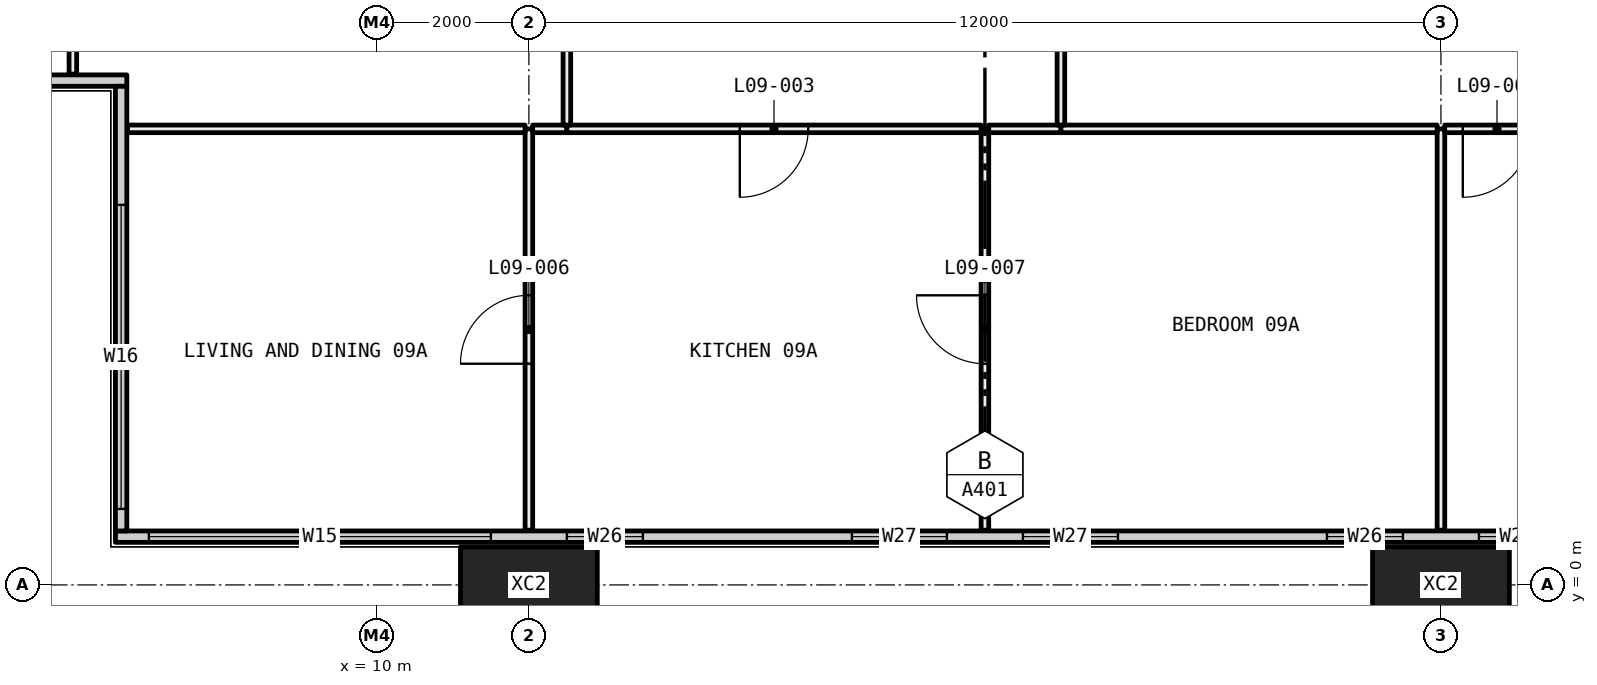
"""IFC4 building model, lengths in metres.
Left out: names, types, materials, properties, quantities, classifications, styles, units other than length and angle.
Written with IfcOpenShell. Run it as: python <this file> out.ifc"""

import sys

from ifc_helpers import new_model, si_unit, direction, frame, frame_2d, origin, origin_2d, place, context, subcontext, project, spatial, rectangle, hollow_rectangle, extrude, element, fill, save


model = new_model("IFC4")
c1 = context("Model", 3, precision=1e-05, world=origin(), true_north=direction((0.0, 1.0)))
c2 = subcontext(c1, "Body", "Model", "MODEL_VIEW")
j1 = project(units=[si_unit("LENGTHUNIT", "METRE"), si_unit("PLANEANGLEUNIT", "RADIAN")], contexts=[c1])
p1 = place(None, origin())
s1 = spatial("IfcSite", under=j1, at=p1, CompositionType="ELEMENT")
p2 = place(p1, origin())
s2 = spatial("IfcBuilding", under=s1, at=p2, CompositionType="ELEMENT")
p3 = place(p2, frame((0.0, 0.0, 43.8)))
s3 = spatial("IfcBuildingStorey", under=s2, at=p3, CompositionType="ELEMENT", Elevation=43.8)
for number, where, z_axis, x_axis in (
    (1, (12.0, 0.0, -0.4), (0.0, 0.0, 1.0), (1.0, 0.0, 0.0)),
    (2, (24.0, 0.0, -0.4), (0.0, 0.0, 1.0), (1.0, 0.0, 0.0)),
):
    element("IfcColumn", number, at=place(p3, frame(where, z_axis=z_axis, x_axis=x_axis)), inside=s3, PredefinedType="COLUMN", context=c2, shape_type="SweptSolid", body=[
        extrude(hollow_rectangle(XDim=1.8, YDim=1.0, WallThickness=0.07, at=origin_2d()), origin(), (0.0, 0.0, 1.0), 3.45),
    ])
p4 = place(p3, frame((6.56, 0.635, 0.0), z_axis=(0.0, 0.0, 1.0), x_axis=(1.0, 0.0, 0.0)))
e3 = element("IfcWall", 3, at=p4, inside=s3, PredefinedType="ELEMENTEDWALL", context=c2, shape_type="SweptSolid", body=[
    extrude(rectangle(XDim=58.88, YDim=0.15, at=frame_2d((29.44, 0.0))), origin(), (0.0, 0.0, 1.0), 3.05),
])
p5 = place(p4, frame((0.44, 0.0, 0.45)))
e4 = element("IfcOpeningElement", 4, at=p5, cuts=e3, PredefinedType="OPENING", context=c2, shape_type="SweptSolid", body=[
    extrude(rectangle(XDim=4.5, YDim=2.55, at=frame_2d((2.25, 1.275))), frame((0.0, 0.085, 0.0), z_axis=(0.0, -1.0, 0.0), x_axis=(1.0, 0.0, 0.0)), (0.0, 0.0, 1.0), 0.17),
])
p6 = place(p4, frame((5.94, 0.0, 0.45)))
e5 = element("IfcOpeningElement", 5, at=p6, cuts=e3, PredefinedType="OPENING", context=c2, shape_type="SweptSolid", body=[
    extrude(rectangle(XDim=1.0, YDim=2.55, at=frame_2d((0.5, 1.275))), frame((0.0, 0.085, 0.0), z_axis=(0.0, -1.0, 0.0), x_axis=(1.0, 0.0, 0.0)), (0.0, 0.0, 1.0), 0.17),
])
p7 = place(p4, frame((9.69, 0.0, 0.45)))
e6 = element("IfcOpeningElement", 6, at=p7, cuts=e3, PredefinedType="OPENING", context=c2, shape_type="SweptSolid", body=[
    extrude(rectangle(XDim=1.25, YDim=2.55, at=frame_2d((0.625, 1.275))), frame((0.0, 0.085, 0.0), z_axis=(0.0, -1.0, 0.0), x_axis=(1.0, 0.0, 0.0)), (0.0, 0.0, 1.0), 0.17),
])
p8 = place(p4, frame((11.94, 0.0, 0.45)))
e7 = element("IfcOpeningElement", 7, at=p8, cuts=e3, PredefinedType="OPENING", context=c2, shape_type="SweptSolid", body=[
    extrude(rectangle(XDim=1.25, YDim=2.55, at=frame_2d((0.625, 1.275))), frame((0.0, 0.085, 0.0), z_axis=(0.0, -1.0, 0.0), x_axis=(1.0, 0.0, 0.0)), (0.0, 0.0, 1.0), 0.17),
])
p9 = place(p4, frame((15.94, 0.0, 0.45)))
e8 = element("IfcOpeningElement", 8, at=p9, cuts=e3, PredefinedType="OPENING", context=c2, shape_type="SweptSolid", body=[
    extrude(rectangle(XDim=1.0, YDim=2.55, at=frame_2d((0.5, 1.275))), frame((0.0, 0.085, 0.0), z_axis=(0.0, -1.0, 0.0), x_axis=(1.0, 0.0, 0.0)), (0.0, 0.0, 1.0), 0.17),
])
p10 = place(p4, frame((17.94, 0.0, 0.45)))
e9 = element("IfcOpeningElement", 9, at=p10, cuts=e3, PredefinedType="OPENING", context=c2, shape_type="SweptSolid", body=[
    extrude(rectangle(XDim=1.0, YDim=2.55, at=frame_2d((0.5, 1.275))), frame((0.0, 0.085, 0.0), z_axis=(0.0, -1.0, 0.0), x_axis=(1.0, 0.0, 0.0)), (0.0, 0.0, 1.0), 0.17),
])
p11 = place(p4, frame((21.69, 0.0, 0.45)))
e10 = element("IfcOpeningElement", 10, at=p11, cuts=e3, PredefinedType="OPENING", context=c2, shape_type="SweptSolid", body=[
    extrude(rectangle(XDim=1.25, YDim=2.55, at=frame_2d((0.625, 1.275))), frame((0.0, 0.085, 0.0), z_axis=(0.0, -1.0, 0.0), x_axis=(1.0, 0.0, 0.0)), (0.0, 0.0, 1.0), 0.17),
])
p12 = place(p4, frame((23.94, 0.0, 0.45)))
e11 = element("IfcOpeningElement", 11, at=p12, cuts=e3, PredefinedType="OPENING", context=c2, shape_type="SweptSolid", body=[
    extrude(rectangle(XDim=1.25, YDim=2.55, at=frame_2d((0.625, 1.275))), frame((0.0, 0.085, 0.0), z_axis=(0.0, -1.0, 0.0), x_axis=(1.0, 0.0, 0.0)), (0.0, 0.0, 1.0), 0.17),
])
p13 = place(p4, frame((27.94, 0.0, 0.45)))
e12 = element("IfcOpeningElement", 12, at=p13, cuts=e3, PredefinedType="OPENING", context=c2, shape_type="SweptSolid", body=[
    extrude(rectangle(XDim=1.0, YDim=2.55, at=frame_2d((0.5, 1.275))), frame((0.0, 0.085, 0.0), z_axis=(0.0, -1.0, 0.0), x_axis=(1.0, 0.0, 0.0)), (0.0, 0.0, 1.0), 0.17),
])
p14 = place(p4, frame((29.94, 0.0, 0.45)))
e13 = element("IfcOpeningElement", 13, at=p14, cuts=e3, PredefinedType="OPENING", context=c2, shape_type="SweptSolid", body=[
    extrude(rectangle(XDim=1.0, YDim=2.55, at=frame_2d((0.5, 1.275))), frame((0.0, 0.085, 0.0), z_axis=(0.0, -1.0, 0.0), x_axis=(1.0, 0.0, 0.0)), (0.0, 0.0, 1.0), 0.17),
])
p15 = place(p4, frame((33.69, 0.0, 0.45)))
e14 = element("IfcOpeningElement", 14, at=p15, cuts=e3, PredefinedType="OPENING", context=c2, shape_type="SweptSolid", body=[
    extrude(rectangle(XDim=1.25, YDim=2.55, at=frame_2d((0.625, 1.275))), frame((0.0, 0.085, 0.0), z_axis=(0.0, -1.0, 0.0), x_axis=(1.0, 0.0, 0.0)), (0.0, 0.0, 1.0), 0.17),
])
p16 = place(p4, frame((35.94, 0.0, 0.45)))
e15 = element("IfcOpeningElement", 15, at=p16, cuts=e3, PredefinedType="OPENING", context=c2, shape_type="SweptSolid", body=[
    extrude(rectangle(XDim=1.25, YDim=2.55, at=frame_2d((0.625, 1.275))), frame((0.0, 0.085, 0.0), z_axis=(0.0, -1.0, 0.0), x_axis=(1.0, 0.0, 0.0)), (0.0, 0.0, 1.0), 0.17),
])
p17 = place(p4, frame((39.94, 0.0, 0.45)))
e16 = element("IfcOpeningElement", 16, at=p17, cuts=e3, PredefinedType="OPENING", context=c2, shape_type="SweptSolid", body=[
    extrude(rectangle(XDim=1.0, YDim=2.55, at=frame_2d((0.5, 1.275))), frame((0.0, 0.085, 0.0), z_axis=(0.0, -1.0, 0.0), x_axis=(1.0, 0.0, 0.0)), (0.0, 0.0, 1.0), 0.17),
])
p18 = place(p4, frame((41.94, 0.0, 0.45)))
e17 = element("IfcOpeningElement", 17, at=p18, cuts=e3, PredefinedType="OPENING", context=c2, shape_type="SweptSolid", body=[
    extrude(rectangle(XDim=1.0, YDim=2.55, at=frame_2d((0.5, 1.275))), frame((0.0, 0.085, 0.0), z_axis=(0.0, -1.0, 0.0), x_axis=(1.0, 0.0, 0.0)), (0.0, 0.0, 1.0), 0.17),
])
p19 = place(p4, frame((45.69, 0.0, 0.45)))
e18 = element("IfcOpeningElement", 18, at=p19, cuts=e3, PredefinedType="OPENING", context=c2, shape_type="SweptSolid", body=[
    extrude(rectangle(XDim=1.25, YDim=2.55, at=frame_2d((0.625, 1.275))), frame((0.0, 0.085, 0.0), z_axis=(0.0, -1.0, 0.0), x_axis=(1.0, 0.0, 0.0)), (0.0, 0.0, 1.0), 0.17),
])
p20 = place(p4, frame((47.94, 0.0, 0.45)))
e19 = element("IfcOpeningElement", 19, at=p20, cuts=e3, PredefinedType="OPENING", context=c2, shape_type="SweptSolid", body=[
    extrude(rectangle(XDim=1.25, YDim=2.55, at=frame_2d((0.625, 1.275))), frame((0.0, 0.085, 0.0), z_axis=(0.0, -1.0, 0.0), x_axis=(1.0, 0.0, 0.0)), (0.0, 0.0, 1.0), 0.17),
])
p21 = place(p4, frame((51.94, 0.0, 0.45)))
e20 = element("IfcOpeningElement", 20, at=p21, cuts=e3, PredefinedType="OPENING", context=c2, shape_type="SweptSolid", body=[
    extrude(rectangle(XDim=1.0, YDim=2.55, at=frame_2d((0.5, 1.275))), frame((0.0, 0.085, 0.0), z_axis=(0.0, -1.0, 0.0), x_axis=(1.0, 0.0, 0.0)), (0.0, 0.0, 1.0), 0.17),
])
p22 = place(p4, frame((53.94, 0.0, 0.45)))
e21 = element("IfcOpeningElement", 21, at=p22, cuts=e3, PredefinedType="OPENING", context=c2, shape_type="SweptSolid", body=[
    extrude(rectangle(XDim=4.5, YDim=2.55, at=frame_2d((2.25, 1.275))), frame((0.0, 0.085, 0.0), z_axis=(0.0, -1.0, 0.0), x_axis=(1.0, 0.0, 0.0)), (0.0, 0.0, 1.0), 0.17),
])
p23 = place(p3, frame((0.56, 6.635, 0.0), z_axis=(0.0, 0.0, 1.0), x_axis=(1.0, 0.0, 0.0)))
e22 = element("IfcWall", 22, at=p23, inside=s3, PredefinedType="ELEMENTEDWALL", context=c2, shape_type="SweptSolid", body=[
    extrude(rectangle(XDim=6.15, YDim=0.15, at=frame_2d((3.075, 0.0))), origin(), (0.0, 0.0, 1.0), 3.05),
])
p24 = place(p23, frame((0.44, 0.0, 0.45)))
e23 = element("IfcOpeningElement", 23, at=p24, cuts=e22, PredefinedType="OPENING", context=c2, shape_type="SweptSolid", body=[
    extrude(rectangle(XDim=4.0, YDim=2.55, at=frame_2d((2.0, 1.275))), frame((0.0, 0.085, 0.0), z_axis=(0.0, -1.0, 0.0), x_axis=(1.0, 0.0, 0.0)), (0.0, 0.0, 1.0), 0.17),
])
p25 = place(p3, frame((6.635, 0.71, 0.0), z_axis=(0.0, 0.0, 1.0), x_axis=(0.0, 1.0, 0.0)))
e24 = element("IfcWall", 24, at=p25, inside=s3, PredefinedType="ELEMENTEDWALL", context=c2, shape_type="SweptSolid", body=[
    extrude(rectangle(XDim=5.85, YDim=0.15, at=frame_2d((2.925, 0.0))), origin(), (0.0, 0.0, 1.0), 3.05),
])
p26 = place(p25, frame((0.29, 0.0, 0.45)))
e25 = element("IfcOpeningElement", 25, at=p26, cuts=e24, PredefinedType="OPENING", context=c2, shape_type="SweptSolid", body=[
    extrude(rectangle(XDim=4.0, YDim=2.55, at=frame_2d((2.0, 1.275))), frame((0.0, 0.085, 0.0), z_axis=(0.0, -1.0, 0.0), x_axis=(1.0, 0.0, 0.0)), (0.0, 0.0, 1.0), 0.17),
])
p27 = place(p3, frame((12.0, 0.72, 0.0), z_axis=(0.0, 0.0, 1.0), x_axis=(0.0, 1.0, 0.0)))
e26 = element("IfcWall", 26, at=p27, inside=s3, PredefinedType="PARTITIONING", context=c2, shape_type="SweptSolid", body=[
    extrude(rectangle(XDim=5.28, YDim=0.1, at=frame_2d((2.64, 0.0))), origin(), (0.0, 0.0, 1.0), 2.45),
])
p28 = place(p27, frame((2.19, 0.0, 0.0)))
e27 = element("IfcOpeningElement", 27, at=p28, cuts=e26, PredefinedType="OPENING", context=c2, shape_type="SweptSolid", body=[
    extrude(rectangle(XDim=0.9, YDim=2.1, at=frame_2d((0.45, 1.05))), frame((0.0, 0.06, 0.0), z_axis=(0.0, -1.0, 0.0), x_axis=(1.0, 0.0, 0.0)), (0.0, 0.0, 1.0), 0.12),
])
p29 = place(p3, frame((11.95, 6.0, 0.0), z_axis=(0.0, 0.0, 1.0), x_axis=(-1.0, 0.0, 0.0)))
e28 = element("IfcWall", 28, at=p29, inside=s3, PredefinedType="PARTITIONING", context=c2, shape_type="SweptSolid", body=[
    extrude(rectangle(XDim=5.23, YDim=0.1, at=frame_2d((2.615, 0.0))), origin(), (0.0, 0.0, 1.0), 2.45),
])
p30 = place(p3, frame((18.0, 0.72, 0.0), z_axis=(0.0, 0.0, 1.0), x_axis=(0.0, 1.0, 0.0)))
e29 = element("IfcWall", 29, at=p30, inside=s3, PredefinedType="PARTITIONING", context=c2, shape_type="SweptSolid", body=[
    extrude(rectangle(XDim=5.28, YDim=0.1, at=frame_2d((2.64, 0.0))), origin(), (0.0, 0.0, 1.0), 3.05),
])
p31 = place(p30, frame((2.19, 0.0, 0.0)))
e30 = element("IfcOpeningElement", 30, at=p31, cuts=e29, PredefinedType="OPENING", context=c2, shape_type="SweptSolid", body=[
    extrude(rectangle(XDim=0.9, YDim=2.1, at=frame_2d((0.45, 1.05))), frame((0.0, 0.06, 0.0), z_axis=(0.0, -1.0, 0.0), x_axis=(1.0, 0.0, 0.0)), (0.0, 0.0, 1.0), 0.12),
])
p32 = place(p3, frame((12.5, 6.0, 0.0), z_axis=(0.0, 0.0, 1.0), x_axis=(-1.0, 0.0, 0.0)))
e31 = element("IfcWall", 31, at=p32, inside=s3, PredefinedType="PARTITIONING", context=c2, shape_type="SweptSolid", body=[
    extrude(rectangle(XDim=0.45, YDim=0.1, at=frame_2d((0.225, 0.0))), origin(), (0.0, 0.0, 1.0), 2.45),
])
p33 = place(p3, frame((17.95, 6.0, 0.0), z_axis=(0.0, 0.0, 1.0), x_axis=(-1.0, 0.0, 0.0)))
e32 = element("IfcWall", 32, at=p33, inside=s3, PredefinedType="PARTITIONING", context=c2, shape_type="SweptSolid", body=[
    extrude(rectangle(XDim=5.45, YDim=0.1, at=frame_2d((2.725, 0.0))), origin(), (0.0, 0.0, 1.0), 3.05),
])
p34 = place(p33, frame((2.275, 0.0, 0.0)))
e33 = element("IfcOpeningElement", 33, at=p34, cuts=e32, PredefinedType="OPENING", context=c2, shape_type="SweptSolid", body=[
    extrude(rectangle(XDim=0.9, YDim=2.1, at=frame_2d((0.45, 1.05))), frame((0.0, 0.06, 0.0), z_axis=(0.0, -1.0, 0.0), x_axis=(1.0, 0.0, 0.0)), (0.0, 0.0, 1.0), 0.12),
])
p35 = place(p3, frame((24.0, 0.72, 0.0), z_axis=(0.0, 0.0, 1.0), x_axis=(0.0, 1.0, 0.0)))
e34 = element("IfcWall", 34, at=p35, inside=s3, PredefinedType="PARTITIONING", context=c2, shape_type="SweptSolid", body=[
    extrude(rectangle(XDim=5.28, YDim=0.1, at=frame_2d((2.64, 0.0))), origin(), (0.0, 0.0, 1.0), 2.45),
])
p36 = place(p3, frame((19.0, 6.0, 0.0), z_axis=(0.0, 0.0, 1.0), x_axis=(-1.0, 0.0, 0.0)))
e35 = element("IfcWall", 35, at=p36, inside=s3, PredefinedType="PARTITIONING", context=c2, shape_type="SweptSolid", body=[
    extrude(rectangle(XDim=0.95, YDim=0.1, at=frame_2d((0.475, 0.0))), origin(), (0.0, 0.0, 1.0), 3.05),
])
p37 = place(p3, frame((23.95, 6.0, 0.0), z_axis=(0.0, 0.0, 1.0), x_axis=(-1.0, 0.0, 0.0)))
e36 = element("IfcWall", 36, at=p37, inside=s3, PredefinedType="PARTITIONING", context=c2, shape_type="SweptSolid", body=[
    extrude(rectangle(XDim=4.95, YDim=0.1, at=frame_2d((2.475, 0.0))), origin(), (0.0, 0.0, 1.0), 2.45),
])
p38 = place(p3, frame((25.425, 6.0, 0.0), z_axis=(0.0, 0.0, 1.0), x_axis=(-1.0, 0.0, 0.0)))
e37 = element("IfcWall", 37, at=p38, inside=s3, PredefinedType="PARTITIONING", context=c2, shape_type="SweptSolid", body=[
    extrude(rectangle(XDim=1.375, YDim=0.1, at=frame_2d((0.688, 0.0))), origin(), (0.0, 0.0, 1.0), 2.45),
])
p39 = place(p38, frame((0.238, 0.0, 0.0)))
e38 = element("IfcOpeningElement", 38, at=p39, cuts=e37, PredefinedType="OPENING", context=c2, shape_type="SweptSolid", body=[
    extrude(rectangle(XDim=0.9, YDim=2.1, at=frame_2d((0.45, 1.05))), frame((0.0, 0.06, 0.0), z_axis=(0.0, -1.0, 0.0), x_axis=(1.0, 0.0, 0.0)), (0.0, 0.0, 1.0), 0.12),
])
p40 = place(p3, frame((6.0, 6.72, 0.0), z_axis=(0.0, 0.0, 1.0), x_axis=(0.0, 1.0, 0.0)))
e39 = element("IfcWall", 39, at=p40, inside=s3, PredefinedType="PARTITIONING", context=c2, shape_type="SweptSolid", body=[
    extrude(rectangle(XDim=5.28, YDim=0.1, at=frame_2d((2.64, 0.0))), origin(), (0.0, 0.0, 1.0), 2.45),
])
p41 = place(p40, frame((2.19, 0.0, 0.0)))
e40 = element("IfcOpeningElement", 40, at=p41, cuts=e39, PredefinedType="OPENING", context=c2, shape_type="SweptSolid", body=[
    extrude(rectangle(XDim=0.9, YDim=2.1, at=frame_2d((0.45, 1.05))), frame((0.0, 0.06, 0.0), z_axis=(0.0, -1.0, 0.0), x_axis=(1.0, 0.0, 0.0)), (0.0, 0.0, 1.0), 0.12),
])
p42 = place(p3, frame((12.5, 6.05, 0.0), z_axis=(0.0, 0.0, 1.0), x_axis=(0.0, 1.0, 0.0)))
e41 = element("IfcWall", 41, at=p42, inside=s3, PredefinedType="PARTITIONING", context=c2, shape_type="SweptSolid", body=[
    extrude(rectangle(XDim=5.15, YDim=0.1, at=frame_2d((2.575, 0.0))), origin(), (0.0, 0.0, 1.0), 3.05),
])
p43 = place(p42, frame((2.125, 0.0, 0.0)))
e42 = element("IfcOpeningElement", 42, at=p43, cuts=e41, PredefinedType="OPENING", context=c2, shape_type="SweptSolid", body=[
    extrude(rectangle(XDim=0.9, YDim=2.1, at=frame_2d((0.45, 1.05))), frame((0.0, 0.06, 0.0), z_axis=(0.0, -1.0, 0.0), x_axis=(1.0, 0.0, 0.0)), (0.0, 0.0, 1.0), 0.12),
])
p44 = place(p3, frame((19.0, 6.05, 0.0), z_axis=(0.0, 0.0, 1.0), x_axis=(0.0, 1.0, 0.0)))
e43 = element("IfcWall", 43, at=p44, inside=s3, PredefinedType="PARTITIONING", context=c2, shape_type="SweptSolid", body=[
    extrude(rectangle(XDim=5.95, YDim=0.1, at=frame_2d((2.975, 0.0))), origin(), (0.0, 0.0, 1.0), 2.45),
])
p45 = place(p44, frame((2.525, 0.0, 0.0)))
e44 = element("IfcOpeningElement", 44, at=p45, cuts=e43, PredefinedType="OPENING", context=c2, shape_type="SweptSolid", body=[
    extrude(rectangle(XDim=0.9, YDim=2.1, at=frame_2d((0.45, 1.05))), frame((0.0, 0.06, 0.0), z_axis=(0.0, -1.0, 0.0), x_axis=(1.0, 0.0, 0.0)), (0.0, 0.0, 1.0), 0.12),
])
p46 = place(p5, origin())
e45 = element("IfcWindow", 45, at=p46, inside=s3, PartitioningType="SINGLE_PANEL", PredefinedType="WINDOW", context=c2, shape_type="SweptSolid", body=[
    extrude(rectangle(XDim=4.5, YDim=2.55, at=frame_2d((2.25, 1.275))), frame((0.0, 0.03, 0.0), z_axis=(0.0, -1.0, 0.0), x_axis=(1.0, 0.0, 0.0)), (0.0, 0.0, 1.0), 0.06),
])
fill(e4, e45)
p47 = place(p6, origin())
e46 = element("IfcWindow", 46, at=p47, inside=s3, PartitioningType="SINGLE_PANEL", PredefinedType="WINDOW", context=c2, shape_type="SweptSolid", body=[
    extrude(rectangle(XDim=1.0, YDim=2.55, at=frame_2d((0.5, 1.275))), frame((0.0, 0.03, 0.0), z_axis=(0.0, -1.0, 0.0), x_axis=(1.0, 0.0, 0.0)), (0.0, 0.0, 1.0), 0.06),
])
fill(e5, e46)
p48 = place(p7, origin())
e47 = element("IfcWindow", 47, at=p48, inside=s3, PartitioningType="SINGLE_PANEL", PredefinedType="WINDOW", context=c2, shape_type="SweptSolid", body=[
    extrude(rectangle(XDim=1.25, YDim=2.55, at=frame_2d((0.625, 1.275))), frame((0.0, 0.03, 0.0), z_axis=(0.0, -1.0, 0.0), x_axis=(1.0, 0.0, 0.0)), (0.0, 0.0, 1.0), 0.06),
])
fill(e6, e47)
p49 = place(p8, origin())
e48 = element("IfcWindow", 48, at=p49, inside=s3, PartitioningType="SINGLE_PANEL", PredefinedType="WINDOW", context=c2, shape_type="SweptSolid", body=[
    extrude(rectangle(XDim=1.25, YDim=2.55, at=frame_2d((0.625, 1.275))), frame((0.0, 0.03, 0.0), z_axis=(0.0, -1.0, 0.0), x_axis=(1.0, 0.0, 0.0)), (0.0, 0.0, 1.0), 0.06),
])
fill(e7, e48)
p50 = place(p9, origin())
e49 = element("IfcWindow", 49, at=p50, inside=s3, PartitioningType="SINGLE_PANEL", PredefinedType="WINDOW", context=c2, shape_type="SweptSolid", body=[
    extrude(rectangle(XDim=1.0, YDim=2.55, at=frame_2d((0.5, 1.275))), frame((0.0, 0.03, 0.0), z_axis=(0.0, -1.0, 0.0), x_axis=(1.0, 0.0, 0.0)), (0.0, 0.0, 1.0), 0.06),
])
fill(e8, e49)
p51 = place(p10, origin())
e50 = element("IfcWindow", 50, at=p51, inside=s3, PartitioningType="SINGLE_PANEL", PredefinedType="WINDOW", context=c2, shape_type="SweptSolid", body=[
    extrude(rectangle(XDim=1.0, YDim=2.55, at=frame_2d((0.5, 1.275))), frame((0.0, 0.03, 0.0), z_axis=(0.0, -1.0, 0.0), x_axis=(1.0, 0.0, 0.0)), (0.0, 0.0, 1.0), 0.06),
])
fill(e9, e50)
p52 = place(p26, origin())
e51 = element("IfcWindow", 51, at=p52, inside=s3, PartitioningType="SINGLE_PANEL", PredefinedType="WINDOW", context=c2, shape_type="SweptSolid", body=[
    extrude(rectangle(XDim=4.0, YDim=2.55, at=frame_2d((2.0, 1.275))), frame((0.0, 0.03, 0.0), z_axis=(0.0, -1.0, 0.0), x_axis=(1.0, 0.0, 0.0)), (0.0, 0.0, 1.0), 0.06),
])
fill(e25, e51)
p53 = place(p34, origin())
e52 = element("IfcDoor", 52, at=p53, inside=s3, OperationType="SINGLE_SWING_LEFT", PredefinedType="DOOR", context=c2, shape_type="SweptSolid", body=[
    extrude(rectangle(XDim=0.9, YDim=2.1, at=frame_2d((0.45, 1.05))), frame((0.0, 0.025, 0.0), z_axis=(0.0, -1.0, 0.0), x_axis=(1.0, 0.0, 0.0)), (0.0, 0.0, 1.0), 0.05),
])
fill(e33, e52)
p54 = place(p28, origin())
e53 = element("IfcDoor", 53, at=p54, inside=s3, OperationType="SINGLE_SWING_RIGHT", PredefinedType="DOOR", context=c2, shape_type="SweptSolid", body=[
    extrude(rectangle(XDim=0.9, YDim=2.1, at=frame_2d((0.45, 1.05))), frame((0.0, 0.025, 0.0), z_axis=(0.0, -1.0, 0.0), x_axis=(1.0, 0.0, 0.0)), (0.0, 0.0, 1.0), 0.05),
])
fill(e27, e53)
p55 = place(p31, origin())
e54 = element("IfcDoor", 54, at=p55, inside=s3, OperationType="SINGLE_SWING_LEFT", PredefinedType="DOOR", context=c2, shape_type="SweptSolid", body=[
    extrude(rectangle(XDim=0.9, YDim=2.1, at=frame_2d((0.45, 1.05))), frame((0.0, 0.025, 0.0), z_axis=(0.0, -1.0, 0.0), x_axis=(1.0, 0.0, 0.0)), (0.0, 0.0, 1.0), 0.05),
])
fill(e30, e54)
p56 = place(p39, origin())
e55 = element("IfcDoor", 55, at=p56, inside=s3, OperationType="SINGLE_SWING_LEFT", PredefinedType="DOOR", context=c2, shape_type="SweptSolid", body=[
    extrude(rectangle(XDim=0.9, YDim=2.1, at=frame_2d((0.45, 1.05))), frame((0.0, 0.025, 0.0), z_axis=(0.0, -1.0, 0.0), x_axis=(1.0, 0.0, 0.0)), (0.0, 0.0, 1.0), 0.05),
])
fill(e38, e55)
save(model, sys.argv[1])
